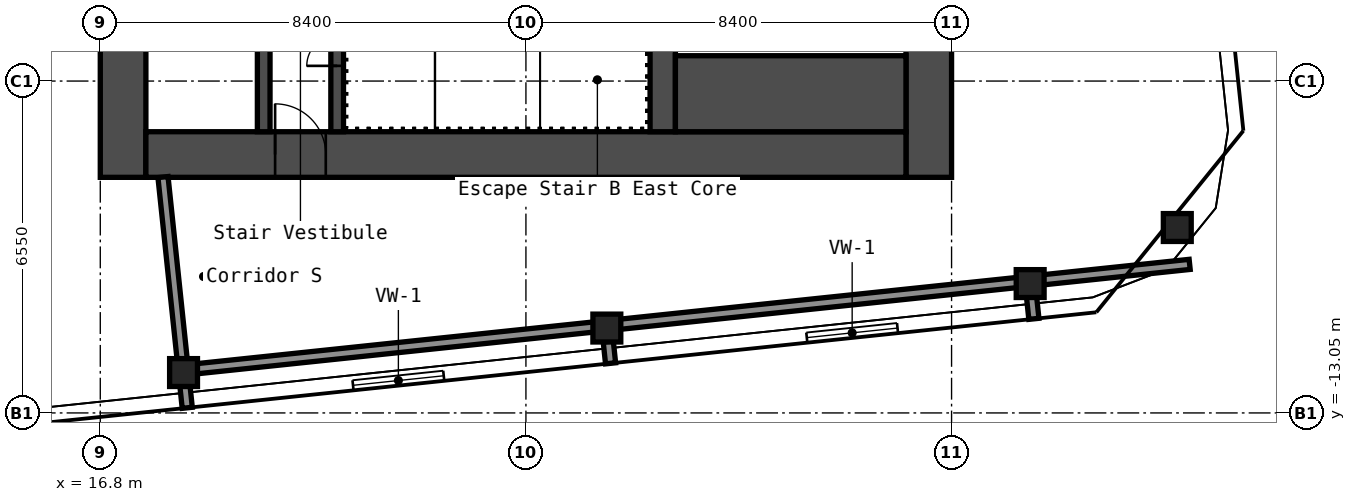
"""IFC4 building model, lengths in metres.
Left out: names, types, materials, properties, quantities, classifications, styles, units other than length and angle.
Written with IfcOpenShell. Run it as: python <this file> out.ifc"""

import sys

from ifc_helpers import new_model, si_unit, direction, frame, frame_2d, origin, origin_2d, place, context, subcontext, project, spatial, rectangle, hollow_rectangle, extrude, element, fill, save


model = new_model("IFC4")
c1 = context("Model", 3, precision=1e-05, world=origin(), true_north=direction((0.0, 1.0)))
c2 = subcontext(c1, "Body", "Model", "MODEL_VIEW")
j1 = project(units=[si_unit("LENGTHUNIT", "METRE"), si_unit("PLANEANGLEUNIT", "RADIAN")], contexts=[c1])
p1 = place(None, origin())
s1 = spatial("IfcSite", under=j1, at=p1, CompositionType="ELEMENT")
p2 = place(p1, origin())
s2 = spatial("IfcBuilding", under=s1, at=p2, CompositionType="ELEMENT")
p3 = place(p2, frame((0.0, 0.0, 232.6)))
s3 = spatial("IfcBuildingStorey", under=s2, at=p3, CompositionType="ELEMENT", Elevation=232.6)
for number, where, z_axis, x_axis in (
    (1, (18.443, -12.253, 0.0), (0.0, 0.0, 1.0), (1.0, 0.0, 0.0)),
    (2, (26.797, -11.375, 0.0), (0.0, 0.0, 1.0), (1.0, 0.0, 0.0)),
    (3, (35.151, -10.497, 0.0), (0.0, 0.0, 1.0), (1.0, 0.0, 0.0)),
    (4, (38.054, -9.39, 0.0), (0.0, 0.0, 1.0), (1.0, 0.0, 0.0)),
):
    element("IfcColumn", number, at=place(p3, frame(where, z_axis=z_axis, x_axis=x_axis)), inside=s3, PredefinedType="COLUMN", context=c2, shape_type="SweptSolid", body=[
        extrude(hollow_rectangle(XDim=0.55, YDim=0.55, WallThickness=0.022, InnerFilletRadius=0.033, OuterFilletRadius=0.055, at=origin_2d()), origin(), (0.0, 0.0, 1.0), 5.95),
    ])
p4 = place(p3, frame((17.25, -8.4, 0.0), z_axis=(0.0, 0.0, 1.0), x_axis=(0.0, 1.0, 0.0)))
e5 = element("IfcWall", 5, at=p4, inside=s3, PredefinedType="SHEAR", context=c2, shape_type="SweptSolid", body=[
    extrude(rectangle(XDim=16.8, YDim=0.9, at=frame_2d((8.4, 0.0))), origin(), (0.0, 0.0, 1.0), 5.95),
])
p5 = place(p4, frame((11.879, 0.0, 0.0)))
e6 = element("IfcOpeningElement", 6, at=p5, cuts=e5, PredefinedType="OPENING", context=c2, shape_type="SweptSolid", body=[
    extrude(rectangle(XDim=1.6, YDim=2.1, at=frame_2d((0.8, 1.05))), frame((0.0, 0.46, 0.0), z_axis=(0.0, -1.0, 0.0), x_axis=(1.0, 0.0, 0.0)), (0.0, 0.0, 1.0), 0.92),
])
p6 = place(p3, frame((33.15, -8.4, 0.0), z_axis=(0.0, 0.0, 1.0), x_axis=(0.0, 1.0, 0.0)))
e7 = element("IfcWall", 7, at=p6, inside=s3, PredefinedType="SHEAR", context=c2, shape_type="SweptSolid", body=[
    extrude(rectangle(XDim=16.8, YDim=0.9, at=frame_2d((8.4, 0.0))), origin(), (0.0, 0.0, 1.0), 5.95),
])
p7 = place(p3, frame((17.7, -7.95, 0.0), z_axis=(0.0, 0.0, 1.0), x_axis=(1.0, 0.0, 0.0)))
e8 = element("IfcWall", 8, at=p7, inside=s3, PredefinedType="SHEAR", context=c2, shape_type="SweptSolid", body=[
    extrude(rectangle(XDim=15.0, YDim=0.9, at=frame_2d((7.5, 0.0))), origin(), (0.0, 0.0, 1.0), 5.95),
])
p8 = place(p7, frame((2.55, 0.0, 0.0)))
e9 = element("IfcOpeningElement", 9, at=p8, cuts=e8, PredefinedType="OPENING", context=c2, shape_type="SweptSolid", body=[
    extrude(rectangle(XDim=1.0, YDim=2.1, at=frame_2d((0.5, 1.05))), frame((0.0, 0.46, 0.0), z_axis=(0.0, -1.0, 0.0), x_axis=(1.0, 0.0, 0.0)), (0.0, 0.0, 1.0), 0.92),
])
p9 = place(p3, frame((20.025, -7.5, 0.0), z_axis=(0.0, 0.0, 1.0), x_axis=(0.0, 1.0, 0.0)))
e10 = element("IfcWall", 10, at=p9, inside=s3, PredefinedType="SHEAR", context=c2, shape_type="SweptSolid", body=[
    extrude(rectangle(XDim=6.3, YDim=0.25, at=frame_2d((3.15, 0.0))), origin(), (0.0, 0.0, 1.0), 5.95),
])
p10 = place(p9, frame((2.4, 0.0, 0.0)))
e11 = element("IfcOpeningElement", 11, at=p10, cuts=e10, PredefinedType="OPENING", context=c2, shape_type="SweptSolid", body=[
    extrude(rectangle(XDim=1.0, YDim=2.1, at=frame_2d((0.5, 1.05))), frame((0.0, 0.135, 0.0), z_axis=(0.0, -1.0, 0.0), x_axis=(1.0, 0.0, 0.0)), (0.0, 0.0, 1.0), 0.27),
])
p11 = place(p3, frame((21.475, -7.5, 0.0), z_axis=(0.0, 0.0, 1.0), x_axis=(0.0, 1.0, 0.0)))
e12 = element("IfcWall", 12, at=p11, inside=s3, PredefinedType="SHEAR", context=c2, shape_type="SweptSolid", body=[
    extrude(rectangle(XDim=3.75, YDim=0.25, at=frame_2d((1.875, 0.0))), origin(), (0.0, 0.0, 1.0), 5.95),
])
p12 = place(p11, frame((1.3, 0.0, 0.0)))
e13 = element("IfcOpeningElement", 13, at=p12, cuts=e12, PredefinedType="OPENING", context=c2, shape_type="SweptSolid", body=[
    extrude(rectangle(XDim=1.2, YDim=2.1, at=frame_2d((0.6, 1.05))), frame((0.0, 0.135, 0.0), z_axis=(0.0, -1.0, 0.0), x_axis=(1.0, 0.0, 0.0)), (0.0, 0.0, 1.0), 0.27),
])
p13 = place(p3, frame((27.9, -7.5, 0.0), z_axis=(0.0, 0.0, 1.0), x_axis=(0.0, 1.0, 0.0)))
e14 = element("IfcWall", 14, at=p13, inside=s3, PredefinedType="SHEAR", context=c2, shape_type="SweptSolid", body=[
    extrude(rectangle(XDim=3.75, YDim=0.5, at=frame_2d((1.875, 0.0))), origin(), (0.0, 0.0, 1.0), 5.95),
])
p14 = place(p3, frame((28.15, -6.75, 0.0), z_axis=(0.0, 0.0, 1.0), x_axis=(1.0, 0.0, 0.0)))
e15 = element("IfcWall", 15, at=p14, inside=s3, PredefinedType="SHEAR", context=c2, shape_type="SweptSolid", body=[
    extrude(rectangle(XDim=4.55, YDim=1.5, at=frame_2d((2.275, 0.0))), origin(), (0.0, 0.0, 1.0), 5.95),
])
p15 = place(p3, frame((18.708, -12.177, 0.0), z_axis=(0.0, 0.0, 1.0), x_axis=(0.994521604238, 0.104531233147, 0.0)))
e16 = element("IfcWall", 16, at=p15, inside=s3, PredefinedType="PARTITIONING", context=c2, shape_type="SweptSolid", body=[
    extrude(rectangle(XDim=19.698, YDim=0.2, at=frame_2d((9.849, 0.0))), origin(), (0.0, 0.0, 1.0), 5.95),
])
p16 = place(p3, frame((18.516, -12.949, 0.0), z_axis=(0.0, 0.0, 1.0), x_axis=(-0.104548796268, 0.994519758074, 0.0)))
e17 = element("IfcWall", 17, at=p16, inside=s3, PredefinedType="PARTITIONING", context=c2, shape_type="SweptSolid", body=[
    extrude(rectangle(XDim=4.579, YDim=0.2, at=frame_2d((2.29, 0.0))), origin(), (0.0, 0.0, 1.0), 5.95),
])
for number, where, z_axis, x_axis in (
    (18, (26.87, -12.071, 0.0), (0.0, 0.0, 1.0), (-0.105, 0.994, 0.0)),
    (19, (35.224, -11.193, 0.0), (0.0, 0.0, 1.0), (-0.105, 0.994, 0.0)),
):
    element("IfcWall", number, at=place(p3, frame(where, z_axis=z_axis, x_axis=x_axis)), inside=s3, PredefinedType="PARTITIONING", context=c2, shape_type="SweptSolid", body=[
        extrude(rectangle(XDim=0.434, YDim=0.2, at=frame_2d((0.217, 0.0))), origin(), (0.0, 0.0, 1.0), 5.95),
    ])
p17 = place(p3, frame((18.506, -12.85, 4.45), z_axis=(0.0, 0.0, 1.0), x_axis=(0.994523275226, 0.104515333968, 0.0)))
p18 = place(p17, frame((3.3, 0.0, 0.25)))
p19 = place(p18, origin())
e20 = element("IfcWindow", 20, at=p19, inside=s3, PartitioningType="SINGLE_PANEL", PredefinedType="WINDOW", context=c2, shape_type="SweptSolid", body=[
    extrude(rectangle(XDim=1.8, YDim=0.9, at=frame_2d((0.9, 0.45))), frame((0.0, 0.03, 0.0), z_axis=(0.0, -1.0, 0.0), x_axis=(1.0, 0.0, 0.0)), (0.0, 0.0, 1.0), 0.06),
])
p20 = place(p3, frame((26.86, -11.972, 4.45), z_axis=(0.0, 0.0, 1.0), x_axis=(0.994522701643, 0.104520791788, 0.0)))
p21 = place(p20, frame((3.905, 0.0, 0.25)))
p22 = place(p21, origin())
e21 = element("IfcWindow", 21, at=p22, inside=s3, PartitioningType="SINGLE_PANEL", PredefinedType="WINDOW", context=c2, shape_type="SweptSolid", body=[
    extrude(rectangle(XDim=1.8, YDim=0.9, at=frame_2d((0.9, 0.45))), frame((0.0, 0.03, 0.0), z_axis=(0.0, -1.0, 0.0), x_axis=(1.0, 0.0, 0.0)), (0.0, 0.0, 1.0), 0.06),
])
p23 = place(p8, origin())
e22 = element("IfcDoor", 22, at=p23, inside=s3, OperationType="SINGLE_SWING_RIGHT", PredefinedType="DOOR", context=c2, shape_type="SweptSolid", body=[
    extrude(rectangle(XDim=1.0, YDim=2.1, at=frame_2d((0.5, 1.05))), frame((0.0, 0.025, 0.0), z_axis=(0.0, -1.0, 0.0), x_axis=(1.0, 0.0, 0.0)), (0.0, 0.0, 1.0), 0.05),
])
fill(e9, e22)
p24 = place(p12, origin())
e23 = element("IfcDoor", 23, at=p24, inside=s3, OperationType="DOUBLE_DOOR_SINGLE_SWING", PredefinedType="DOOR", context=c2, shape_type="SweptSolid", body=[
    extrude(rectangle(XDim=1.2, YDim=2.1, at=frame_2d((0.6, 1.05))), frame((0.0, 0.025, 0.0), z_axis=(0.0, -1.0, 0.0), x_axis=(1.0, 0.0, 0.0)), (0.0, 0.0, 1.0), 0.05),
])
fill(e13, e23)
save(model, sys.argv[1])
